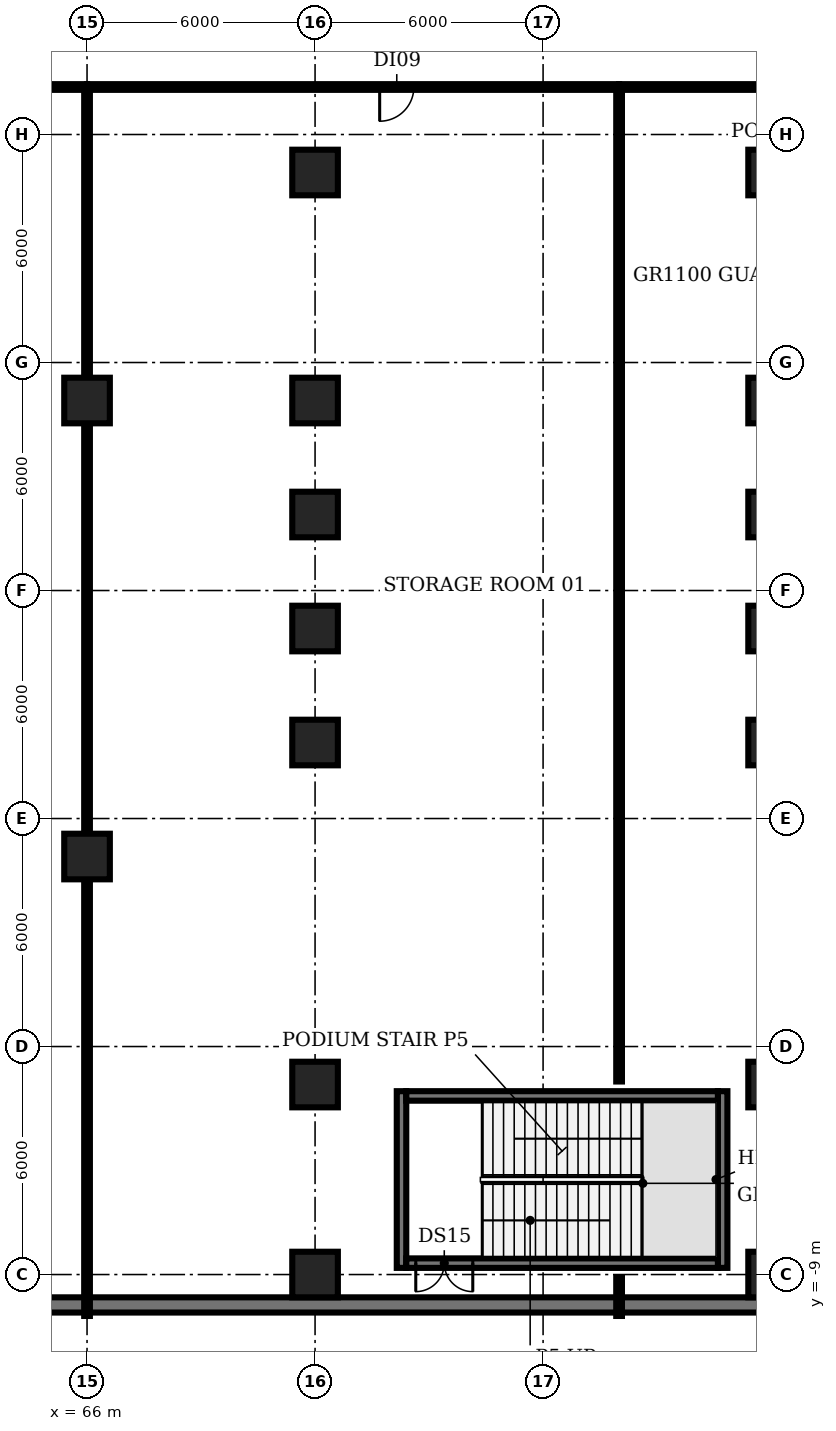
"""IFC4 building model, lengths in metres.
Left out: names, types, materials, properties, quantities, classifications, styles, units other than length and angle.
Written with IfcOpenShell. Run it as: python <this file> out.ifc"""

import sys

from ifc_helpers import new_model, si_unit, direction, frame, frame_2d, origin, origin_2d, place, context, subcontext, project, spatial, rectangle, extrude, element, fill, save


model = new_model("IFC4")
c1 = context("Model", 3, precision=1e-05, world=origin(), true_north=direction((0.0, 1.0)))
c2 = subcontext(c1, "Body", "Model", "MODEL_VIEW")
j1 = project(units=[si_unit("LENGTHUNIT", "METRE"), si_unit("PLANEANGLEUNIT", "RADIAN")], contexts=[c1])
p1 = place(None, origin())
s1 = spatial("IfcSite", under=j1, at=p1, CompositionType="ELEMENT")
p2 = place(p1, origin())
s2 = spatial("IfcBuilding", under=s1, at=p2, CompositionType="ELEMENT")
p3 = place(p2, frame((0.0, 0.0, -6.0)))
s3 = spatial("IfcBuildingStorey", under=s2, at=p3, CompositionType="ELEMENT", Elevation=-6.0)
for number, where, z_axis, x_axis in (
    (1, (66.0, 2.0, -0.3), (0.0, 0.0, 1.0), (1.0, 0.0, 0.0)),
    (2, (66.0, 14.0, -0.3), (0.0, 0.0, 1.0), (1.0, 0.0, 0.0)),
    (3, (72.0, -9.0, -0.3), (0.0, 0.0, 1.0), (1.0, 0.0, 0.0)),
    (4, (72.0, -4.0, -0.3), (0.0, 0.0, 1.0), (1.0, 0.0, 0.0)),
    (5, (72.0, 5.0, -0.3), (0.0, 0.0, 1.0), (1.0, 0.0, 0.0)),
    (6, (72.0, 8.0, -0.3), (0.0, 0.0, 1.0), (1.0, 0.0, 0.0)),
    (7, (72.0, 11.0, -0.3), (0.0, 0.0, 1.0), (1.0, 0.0, 0.0)),
    (8, (72.0, 14.0, -0.3), (0.0, 0.0, 1.0), (1.0, 0.0, 0.0)),
    (9, (72.0, 20.0, -0.3), (0.0, 0.0, 1.0), (1.0, 0.0, 0.0)),
    (10, (84.0, -9.0, -0.3), (0.0, 0.0, 1.0), (1.0, 0.0, 0.0)),
    (11, (84.0, -4.0, -0.3), (0.0, 0.0, 1.0), (1.0, 0.0, 0.0)),
    (12, (84.0, 5.0, -0.3), (0.0, 0.0, 1.0), (1.0, 0.0, 0.0)),
    (13, (84.0, 8.0, -0.3), (0.0, 0.0, 1.0), (1.0, 0.0, 0.0)),
    (14, (84.0, 11.0, -0.3), (0.0, 0.0, 1.0), (1.0, 0.0, 0.0)),
    (15, (84.0, 14.0, -0.3), (0.0, 0.0, 1.0), (1.0, 0.0, 0.0)),
    (16, (84.0, 20.0, -0.3), (0.0, 0.0, 1.0), (1.0, 0.0, 0.0)),
):
    element("IfcColumn", number, at=place(p3, frame(where, z_axis=z_axis, x_axis=x_axis)), inside=s3, PredefinedType="COLUMN", context=c2, shape_type="SweptSolid", body=[
        extrude(rectangle(XDim=1.2, YDim=1.2, at=origin_2d()), origin(), (0.0, 0.0, 1.0), 5.95),
    ])
p4 = place(p3, frame((-0.249, -9.8, 0.0), z_axis=(0.0, 0.0, 1.0), x_axis=(1.0, 0.0, 0.0)))
e17 = element("IfcWall", 17, at=p4, inside=s3, PredefinedType="SOLIDWALL", context=c2, shape_type="SweptSolid", body=[
    extrude(rectangle(XDim=90.497, YDim=0.4, at=frame_2d((45.249, 0.0))), origin(), (0.0, 0.0, 1.0), 5.65),
])
for number, where, z_axis, x_axis in (
    (18, (74.275, -8.825, 0.0), (0.0, 0.0, 1.0), (0.0, 1.0, 0.0)),
    (19, (82.725, -8.825, 0.0), (0.0, 0.0, 1.0), (0.0, 1.0, 0.0)),
):
    element("IfcWall", number, at=place(p3, frame(where, z_axis=z_axis, x_axis=x_axis)), inside=s3, PredefinedType="SHEAR", context=c2, shape_type="SweptSolid", body=[
        extrude(rectangle(XDim=4.65, YDim=0.25, at=frame_2d((2.325, 0.0))), origin(), (0.0, 0.0, 1.0), 5.65),
    ])
p5 = place(p3, frame((82.6, -8.7, 0.0), z_axis=(0.0, 0.0, 1.0), x_axis=(-1.0, 0.0, 0.0)))
e20 = element("IfcWall", 20, at=p5, inside=s3, PredefinedType="SHEAR", context=c2, shape_type="SweptSolid", body=[
    extrude(rectangle(XDim=8.2, YDim=0.25, at=frame_2d((4.1, 0.0))), origin(), (0.0, 0.0, 1.0), 5.65),
])
p6 = place(p5, frame((6.45, 0.0, 0.0)))
e21 = element("IfcOpeningElement", 21, at=p6, cuts=e20, PredefinedType="OPENING", context=c2, shape_type="SweptSolid", body=[
    extrude(rectangle(XDim=1.5, YDim=2.1, at=frame_2d((0.75, 1.05))), frame((0.0, 0.135, 0.0), z_axis=(0.0, -1.0, 0.0), x_axis=(1.0, 0.0, 0.0)), (0.0, 0.0, 1.0), 0.27),
])
p7 = place(p3, frame((74.4, -4.3, 0.0), z_axis=(0.0, 0.0, 1.0), x_axis=(1.0, 0.0, 0.0)))
e22 = element("IfcWall", 22, at=p7, inside=s3, PredefinedType="SHEAR", context=c2, shape_type="SweptSolid", body=[
    extrude(rectangle(XDim=8.2, YDim=0.25, at=frame_2d((4.1, 0.0))), origin(), (0.0, 0.0, 1.0), 5.65),
])
p8 = place(p3, frame((66.0, -10.09, 0.0), z_axis=(0.0, 0.0, 1.0), x_axis=(0.0, 1.0, 0.0)))
e23 = element("IfcWall", 23, at=p8, inside=s3, PredefinedType="PARTITIONING", context=c2, shape_type="SweptSolid", body=[
    extrude(rectangle(XDim=32.34, YDim=0.15, at=frame_2d((16.17, 0.0))), origin(), (0.0, 0.0, 1.0), 4.7),
])
p9 = place(p3, frame((66.0, 22.25, 0.0), z_axis=(0.0, 0.0, 1.0), x_axis=(-1.0, 0.0, 0.0)))
e24 = element("IfcWall", 24, at=p9, inside=s3, PredefinedType="PARTITIONING", context=c2, shape_type="SweptSolid", body=[
    extrude(rectangle(XDim=12.0, YDim=0.15, at=frame_2d((6.0, 0.0))), origin(), (0.0, 0.0, 1.0), 4.7),
])
p10 = place(p9, frame((3.4, 0.0, 0.0)))
e25 = element("IfcOpeningElement", 25, at=p10, cuts=e24, PredefinedType="OPENING", context=c2, shape_type="SweptSolid", body=[
    extrude(rectangle(XDim=1.2, YDim=2.1, at=frame_2d((0.6, 1.05))), frame((0.0, 0.085, 0.0), z_axis=(0.0, -1.0, 0.0), x_axis=(1.0, 0.0, 0.0)), (0.0, 0.0, 1.0), 0.17),
])
p11 = place(p3, frame((80.0, -10.09, 0.0), z_axis=(0.0, 0.0, 1.0), x_axis=(0.0, 1.0, 0.0)))
e26 = element("IfcWall", 26, at=p11, inside=s3, PredefinedType="PARTITIONING", context=c2, shape_type="SweptSolid", body=[
    extrude(rectangle(XDim=1.02, YDim=0.15, at=frame_2d((0.51, 0.0))), origin(), (0.0, 0.0, 1.0), 4.7),
])
p12 = place(p3, frame((80.0, -3.92, 0.0), z_axis=(0.0, 0.0, 1.0), x_axis=(0.0, 1.0, 0.0)))
e27 = element("IfcWall", 27, at=p12, inside=s3, PredefinedType="PARTITIONING", context=c2, shape_type="SweptSolid", body=[
    extrude(rectangle(XDim=26.17, YDim=0.15, at=frame_2d((13.085, 0.0))), origin(), (0.0, 0.0, 1.0), 4.7),
])
p13 = place(p3, frame((80.0, 22.25, 0.0), z_axis=(0.0, 0.0, 1.0), x_axis=(-1.0, 0.0, 0.0)))
e28 = element("IfcWall", 28, at=p13, inside=s3, PredefinedType="PARTITIONING", context=c2, shape_type="SweptSolid", body=[
    extrude(rectangle(XDim=14.0, YDim=0.15, at=frame_2d((7.0, 0.0))), origin(), (0.0, 0.0, 1.0), 4.7),
])
p14 = place(p13, frame((5.4, 0.0, 0.0)))
e29 = element("IfcOpeningElement", 29, at=p14, cuts=e28, PredefinedType="OPENING", context=c2, shape_type="SweptSolid", body=[
    extrude(rectangle(XDim=0.9, YDim=2.1, at=frame_2d((0.45, 1.05))), frame((0.0, 0.085, 0.0), z_axis=(0.0, -1.0, 0.0), x_axis=(1.0, 0.0, 0.0)), (0.0, 0.0, 1.0), 0.17),
])
p15 = place(p3, frame((80.0, 22.25, 0.0), z_axis=(0.0, 0.0, 1.0), x_axis=(1.0, 0.0, 0.0)))
e30 = element("IfcWall", 30, at=p15, inside=s3, PredefinedType="PARTITIONING", context=c2, shape_type="SweptSolid", body=[
    extrude(rectangle(XDim=17.09, YDim=0.15, at=frame_2d((8.545, 0.0))), origin(), (0.0, 0.0, 1.0), 4.7),
])
p16 = place(p6, origin())
e31 = element("IfcDoor", 31, at=p16, inside=s3, OperationType="DOUBLE_DOOR_SINGLE_SWING", PredefinedType="DOOR", context=c2, shape_type="SweptSolid", body=[
    extrude(rectangle(XDim=1.5, YDim=2.1, at=frame_2d((0.75, 1.05))), frame((0.0, 0.025, 0.0), z_axis=(0.0, -1.0, 0.0), x_axis=(1.0, 0.0, 0.0)), (0.0, 0.0, 1.0), 0.05),
])
fill(e21, e31)
p17 = place(p14, origin())
e32 = element("IfcDoor", 32, at=p17, inside=s3, OperationType="SINGLE_SWING_RIGHT", PredefinedType="DOOR", context=c2, shape_type="SweptSolid", body=[
    extrude(rectangle(XDim=0.9, YDim=2.1, at=frame_2d((0.45, 1.05))), frame((0.0, 0.025, 0.0), z_axis=(0.0, -1.0, 0.0), x_axis=(1.0, 0.0, 0.0)), (0.0, 0.0, 1.0), 0.05),
])
fill(e29, e32)
save(model, sys.argv[1])
